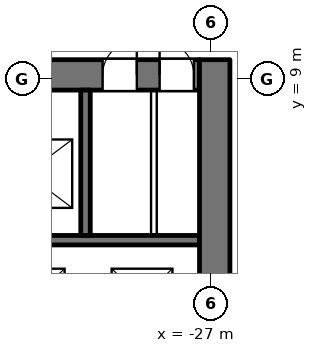
"""IFC4 building model, lengths in metres.
Left out: names, types, materials, properties, quantities, classifications, styles, units other than length and angle.
Written with IfcOpenShell. Run it as: python <this file> out.ifc"""

import sys

from ifc_helpers import new_model, si_unit, direction, frame, frame_2d, origin, place, context, subcontext, project, spatial, rectangle, extrude, element, fill, save


model = new_model("IFC4")
c1 = context("Model", 3, precision=1e-05, world=origin(), true_north=direction((0.0, 1.0)))
c2 = subcontext(c1, "Body", "Model", "MODEL_VIEW")
j1 = project(units=[si_unit("LENGTHUNIT", "METRE"), si_unit("PLANEANGLEUNIT", "RADIAN")], contexts=[c1])
p1 = place(None, origin())
s1 = spatial("IfcSite", under=j1, at=p1, CompositionType="ELEMENT")
p2 = place(p1, origin())
s2 = spatial("IfcBuilding", under=s1, at=p2, CompositionType="ELEMENT")
p3 = place(p2, frame((0.0, 0.0, 7.2)))
s3 = spatial("IfcBuildingStorey", under=s2, at=p3, CompositionType="ELEMENT", Elevation=7.2)
p4 = place(p3, frame((-44.7, 4.75, 0.0), z_axis=(0.0, 0.0, 1.0), x_axis=(1.0, 0.0, 0.0)))
e1 = element("IfcWall", 1, at=p4, inside=s3, PredefinedType="SHEAR", context=c2, shape_type="SweptSolid", body=[
    extrude(rectangle(XDim=17.4, YDim=0.25, at=frame_2d((8.7, 0.0))), origin(), (0.0, 0.0, 1.0), 5.1),
])
p5 = place(p3, frame((-44.7, 9.1, 0.0), z_axis=(0.0, 0.0, 1.0), x_axis=(1.0, 0.0, 0.0)))
e2 = element("IfcWall", 2, at=p5, inside=s3, PredefinedType="SHEAR", context=c2, shape_type="SweptSolid", body=[
    extrude(rectangle(XDim=17.4, YDim=0.8, at=frame_2d((8.7, 0.0))), origin(), (0.0, 0.0, 1.0), 5.1),
])
p6 = place(p5, frame((8.9, 0.0, 0.0)))
e3 = element("IfcOpeningElement", 3, at=p6, cuts=e2, PredefinedType="OPENING", context=c2, shape_type="SweptSolid", body=[
    extrude(rectangle(XDim=1.2, YDim=2.1, at=frame_2d((0.6, 1.05))), frame((0.0, 0.41, 0.0), z_axis=(0.0, -1.0, 0.0), x_axis=(1.0, 0.0, 0.0)), (0.0, 0.0, 1.0), 0.82),
])
p7 = place(p5, frame((14.85, 0.0, 0.0)))
e4 = element("IfcOpeningElement", 4, at=p7, cuts=e2, PredefinedType="OPENING", context=c2, shape_type="SweptSolid", body=[
    extrude(rectangle(XDim=0.9, YDim=2.1, at=frame_2d((0.45, 1.05))), frame((0.0, 0.41, 0.0), z_axis=(0.0, -1.0, 0.0), x_axis=(1.0, 0.0, 0.0)), (0.0, 0.0, 1.0), 0.82),
])
p8 = place(p5, frame((16.35, 0.0, 0.0)))
e5 = element("IfcOpeningElement", 5, at=p8, cuts=e2, PredefinedType="OPENING", context=c2, shape_type="SweptSolid", body=[
    extrude(rectangle(XDim=0.9, YDim=2.1, at=frame_2d((0.45, 1.05))), frame((0.0, 0.41, 0.0), z_axis=(0.0, -1.0, 0.0), x_axis=(1.0, 0.0, 0.0)), (0.0, 0.0, 1.0), 0.82),
])
p9 = place(p3, frame((-30.3, 4.875, 0.0), z_axis=(0.0, 0.0, 1.0), x_axis=(0.0, 1.0, 0.0)))
e6 = element("IfcWall", 6, at=p9, inside=s3, PredefinedType="SHEAR", context=c2, shape_type="SweptSolid", body=[
    extrude(rectangle(XDim=3.825, YDim=0.25, at=frame_2d((1.913, 0.0))), origin(), (0.0, 0.0, 1.0), 5.1),
])
p10 = place(p3, frame((-28.5, 4.875, 0.0), z_axis=(0.0, 0.0, 1.0), x_axis=(0.0, 1.0, 0.0)))
e7 = element("IfcWall", 7, at=p10, inside=s3, PredefinedType="PARTITIONING", context=c2, shape_type="SweptSolid", body=[
    extrude(rectangle(XDim=3.825, YDim=0.15, at=frame_2d((1.913, 0.0))), origin(), (0.0, 0.0, 1.0), 5.1),
])
p11 = place(p3, frame((-26.9, -9.5, 0.0), z_axis=(0.0, 0.0, 1.0), x_axis=(0.0, 1.0, 0.0)))
e8 = element("IfcWall", 8, at=p11, inside=s3, PredefinedType="SHEAR", context=c2, shape_type="SweptSolid", body=[
    extrude(rectangle(XDim=19.0, YDim=0.8, at=frame_2d((9.5, 0.0))), origin(), (0.0, 0.0, 1.0), 5.1),
])
p12 = place(p11, frame((8.3, 0.0, 0.0)))
e9 = element("IfcOpeningElement", 9, at=p12, cuts=e8, PredefinedType="OPENING", context=c2, shape_type="SweptSolid", body=[
    extrude(rectangle(XDim=2.4, YDim=2.1, at=frame_2d((1.2, 1.05))), frame((0.0, 0.41, 0.0), z_axis=(0.0, -1.0, 0.0), x_axis=(1.0, 0.0, 0.0)), (0.0, 0.0, 1.0), 0.82),
])
p13 = place(p7, origin())
e10 = element("IfcDoor", 10, at=p13, inside=s3, OperationType="SINGLE_SWING_RIGHT", PredefinedType="DOOR", context=c2, shape_type="SweptSolid", body=[
    extrude(rectangle(XDim=0.9, YDim=2.1, at=frame_2d((0.45, 1.05))), frame((0.0, -0.225, 0.0), z_axis=(0.0, -1.0, 0.0), x_axis=(1.0, 0.0, 0.0)), (0.0, 0.0, 1.0), 0.05),
])
fill(e4, e10)
p14 = place(p8, origin())
e11 = element("IfcDoor", 11, at=p14, inside=s3, OperationType="SINGLE_SWING_LEFT", PredefinedType="DOOR", context=c2, shape_type="SweptSolid", body=[
    extrude(rectangle(XDim=0.9, YDim=2.1, at=frame_2d((0.45, 1.05))), frame((0.0, -0.225, 0.0), z_axis=(0.0, -1.0, 0.0), x_axis=(1.0, 0.0, 0.0)), (0.0, 0.0, 1.0), 0.05),
])
fill(e5, e11)
save(model, sys.argv[1])
